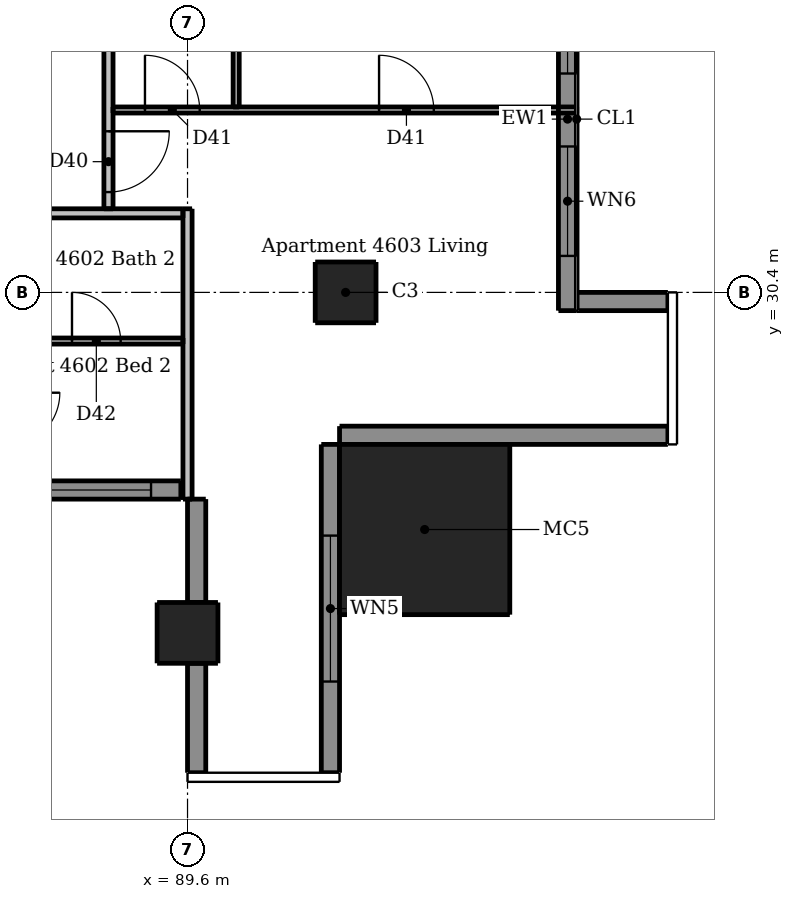
"""IFC4 building model, lengths in metres.
Left out: names, types, materials, properties, quantities, classifications, styles, units other than length and angle.
Written with IfcOpenShell. Run it as: python <this file> out.ifc"""

import sys

from ifc_helpers import new_model, si_unit, direction, frame, frame_2d, origin, origin_2d, place, context, subcontext, project, spatial, rectangle, extrude, element, fill, save


model = new_model("IFC4")
c1 = context("Model", 3, precision=1e-05, world=origin(), true_north=direction((0.0, 1.0)))
c2 = subcontext(c1, "Body", "Model", "MODEL_VIEW")
j1 = project(units=[si_unit("LENGTHUNIT", "METRE"), si_unit("PLANEANGLEUNIT", "RADIAN")], contexts=[c1])
p1 = place(None, origin())
s1 = spatial("IfcSite", under=j1, at=p1, CompositionType="ELEMENT")
p2 = place(p1, origin())
s2 = spatial("IfcBuilding", under=s1, at=p2, CompositionType="ELEMENT")
p3 = place(p2, frame((0.0, 0.0, 171.4)))
s3 = spatial("IfcBuildingStorey", under=s2, at=p3, CompositionType="ELEMENT", Elevation=171.4)
for number, where, z_axis, x_axis in (
    (1, (89.6, 24.8, 0.0), (0.0, 0.0, 1.0), (1.0, 0.0, 0.0)),
    (2, (92.2, 30.4, 0.0), (0.0, 0.0, 1.0), (1.0, 0.0, 0.0)),
):
    element("IfcColumn", number, at=place(p3, frame(where, z_axis=z_axis, x_axis=x_axis)), inside=s3, PredefinedType="COLUMN", context=c2, shape_type="SweptSolid", body=[
        extrude(rectangle(XDim=1.0, YDim=1.0, at=origin_2d()), origin(), (0.0, 0.0, 1.0), 3.05),
    ])
p4 = place(p3, frame((93.5, 26.5, 0.0), z_axis=(0.0, 0.0, 1.0), x_axis=(1.0, 0.0, 0.0)))
e3 = element("IfcColumn", 3, at=p4, inside=s3, PredefinedType="COLUMN", context=c2, shape_type="SweptSolid", body=[
    extrude(rectangle(XDim=2.8, YDim=2.8, at=origin_2d()), origin(), (0.0, 0.0, 1.0), 3.3),
])
p5 = place(p3, frame((89.75, 27.0, 0.0), z_axis=(0.0, 0.0, 1.0), x_axis=(0.0, -1.0, 0.0)))
e4 = element("IfcWall", 4, at=p5, inside=s3, PredefinedType="SOLIDWALL", context=c2, shape_type="SweptSolid", body=[
    extrude(rectangle(XDim=1.7, YDim=0.3, at=frame_2d((0.85, 0.0))), origin(), (0.0, 0.0, 1.0), 3.05),
])
p6 = place(p3, frame((89.75, 24.3, 0.0), z_axis=(0.0, 0.0, 1.0), x_axis=(0.0, -1.0, 0.0)))
e5 = element("IfcWall", 5, at=p6, inside=s3, PredefinedType="SOLIDWALL", context=c2, shape_type="SweptSolid", body=[
    extrude(rectangle(XDim=1.8, YDim=0.3, at=frame_2d((0.9, 0.0))), origin(), (0.0, 0.0, 1.0), 3.05),
])
p7 = place(p3, frame((91.95, 22.5, 0.0), z_axis=(0.0, 0.0, 1.0), x_axis=(0.0, 1.0, 0.0)))
e6 = element("IfcWall", 6, at=p7, inside=s3, PredefinedType="SOLIDWALL", context=c2, shape_type="SweptSolid", body=[
    extrude(rectangle(XDim=5.4, YDim=0.3, at=frame_2d((2.7, 0.0))), origin(), (0.0, 0.0, 1.0), 3.05),
])
p8 = place(p7, frame((1.5, 0.0, 0.15)))
e7 = element("IfcOpeningElement", 7, at=p8, cuts=e6, PredefinedType="OPENING", context=c2, shape_type="SweptSolid", body=[
    extrude(rectangle(XDim=2.4, YDim=2.1, at=frame_2d((1.2, 1.05))), frame((0.0, 0.16, 0.0), z_axis=(0.0, -1.0, 0.0), x_axis=(1.0, 0.0, 0.0)), (0.0, 0.0, 1.0), 0.32),
])
p9 = place(p3, frame((92.1, 28.05, 0.0), z_axis=(0.0, 0.0, 1.0), x_axis=(1.0, 0.0, 0.0)))
e8 = element("IfcWall", 8, at=p9, inside=s3, PredefinedType="SOLIDWALL", context=c2, shape_type="SweptSolid", body=[
    extrude(rectangle(XDim=5.4, YDim=0.3, at=frame_2d((2.7, 0.0))), origin(), (0.0, 0.0, 1.0), 3.05),
])
p10 = place(p3, frame((97.5, 30.25, 0.0), z_axis=(0.0, 0.0, 1.0), x_axis=(-1.0, 0.0, 0.0)))
e9 = element("IfcWall", 9, at=p10, inside=s3, PredefinedType="SOLIDWALL", context=c2, shape_type="SweptSolid", body=[
    extrude(rectangle(XDim=1.5, YDim=0.3, at=frame_2d((0.75, 0.0))), origin(), (0.0, 0.0, 1.0), 3.05),
])
p11 = place(p3, frame((83.7, 27.15, 0.0), z_axis=(0.0, 0.0, 1.0), x_axis=(1.0, 0.0, 0.0)))
e10 = element("IfcWall", 10, at=p11, inside=s3, PredefinedType="SOLIDWALL", context=c2, shape_type="SweptSolid", body=[
    extrude(rectangle(XDim=5.79, YDim=0.3, at=frame_2d((2.895, 0.0))), origin(), (0.0, 0.0, 1.0), 3.05),
])
p12 = place(p11, frame((0.5, 0.0, 0.15)))
e11 = element("IfcOpeningElement", 11, at=p12, cuts=e10, PredefinedType="OPENING", context=c2, shape_type="SweptSolid", body=[
    extrude(rectangle(XDim=1.8, YDim=2.1, at=frame_2d((0.9, 1.05))), frame((0.0, 0.16, 0.0), z_axis=(0.0, -1.0, 0.0), x_axis=(1.0, 0.0, 0.0)), (0.0, 0.0, 1.0), 0.32),
])
p13 = place(p11, frame((3.5, 0.0, 0.15)))
e12 = element("IfcOpeningElement", 12, at=p13, cuts=e10, PredefinedType="OPENING", context=c2, shape_type="SweptSolid", body=[
    extrude(rectangle(XDim=1.8, YDim=2.1, at=frame_2d((0.9, 1.05))), frame((0.0, 0.16, 0.0), z_axis=(0.0, -1.0, 0.0), x_axis=(1.0, 0.0, 0.0)), (0.0, 0.0, 1.0), 0.32),
])
p14 = place(p3, frame((95.85, 30.1, 0.0), z_axis=(0.0, 0.0, 1.0), x_axis=(0.0, 1.0, 0.0)))
e13 = element("IfcWall", 13, at=p14, inside=s3, PredefinedType="SOLIDWALL", context=c2, shape_type="SweptSolid", body=[
    extrude(rectangle(XDim=6.3, YDim=0.3, at=frame_2d((3.15, 0.0))), origin(), (0.0, 0.0, 1.0), 3.05),
])
p15 = place(p14, frame((0.9, 0.0, 0.15)))
e14 = element("IfcOpeningElement", 14, at=p15, cuts=e13, PredefinedType="OPENING", context=c2, shape_type="SweptSolid", body=[
    extrude(rectangle(XDim=1.8, YDim=2.1, at=frame_2d((0.9, 1.05))), frame((0.0, 0.16, 0.0), z_axis=(0.0, -1.0, 0.0), x_axis=(1.0, 0.0, 0.0)), (0.0, 0.0, 1.0), 0.32),
])
p16 = place(p14, frame((3.9, 0.0, 0.15)))
e15 = element("IfcOpeningElement", 15, at=p16, cuts=e13, PredefinedType="OPENING", context=c2, shape_type="SweptSolid", body=[
    extrude(rectangle(XDim=1.8, YDim=2.1, at=frame_2d((0.9, 1.05))), frame((0.0, 0.16, 0.0), z_axis=(0.0, -1.0, 0.0), x_axis=(1.0, 0.0, 0.0)), (0.0, 0.0, 1.0), 0.32),
])
p17 = place(p3, frame((90.4, 33.45, 0.0), z_axis=(0.0, 0.0, 1.0), x_axis=(0.0, 1.0, 0.0)))
e16 = element("IfcWall", 16, at=p17, inside=s3, PredefinedType="PARTITIONING", context=c2, shape_type="SweptSolid", body=[
    extrude(rectangle(XDim=5.875, YDim=0.1, at=frame_2d((2.938, 0.0))), origin(), (0.0, 0.0, 1.0), 3.05),
])
p18 = place(p17, frame((3.75, 0.0, 0.0)))
e17 = element("IfcOpeningElement", 17, at=p18, cuts=e16, PredefinedType="OPENING", context=c2, shape_type="SweptSolid", body=[
    extrude(rectangle(XDim=0.8, YDim=2.1, at=frame_2d((0.4, 1.05))), frame((0.0, 0.06, 0.0), z_axis=(0.0, -1.0, 0.0), x_axis=(1.0, 0.0, 0.0)), (0.0, 0.0, 1.0), 0.12),
])
p19 = place(p3, frame((88.375, 33.4, 0.0), z_axis=(0.0, 0.0, 1.0), x_axis=(1.0, 0.0, 0.0)))
e18 = element("IfcWall", 18, at=p19, inside=s3, PredefinedType="PARTITIONING", context=c2, shape_type="SweptSolid", body=[
    extrude(rectangle(XDim=7.625, YDim=0.1, at=frame_2d((3.812, 0.0))), origin(), (0.0, 0.0, 1.0), 3.05),
])
p20 = place(p19, frame((0.525, 0.0, 0.0)))
e19 = element("IfcOpeningElement", 19, at=p20, cuts=e18, PredefinedType="OPENING", context=c2, shape_type="SweptSolid", body=[
    extrude(rectangle(XDim=0.9, YDim=2.1, at=frame_2d((0.45, 1.05))), frame((0.0, 0.06, 0.0), z_axis=(0.0, -1.0, 0.0), x_axis=(1.0, 0.0, 0.0)), (0.0, 0.0, 1.0), 0.12),
])
p21 = place(p19, frame((4.375, 0.0, 0.0)))
e20 = element("IfcOpeningElement", 20, at=p21, cuts=e18, PredefinedType="OPENING", context=c2, shape_type="SweptSolid", body=[
    extrude(rectangle(XDim=0.9, YDim=2.1, at=frame_2d((0.45, 1.05))), frame((0.0, 0.06, 0.0), z_axis=(0.0, -1.0, 0.0), x_axis=(1.0, 0.0, 0.0)), (0.0, 0.0, 1.0), 0.12),
])
p22 = place(p3, frame((83.65, 29.6, 0.0), z_axis=(0.0, 0.0, 1.0), x_axis=(1.0, 0.0, 0.0)))
e21 = element("IfcWall", 21, at=p22, inside=s3, PredefinedType="PARTITIONING", context=c2, shape_type="SweptSolid", body=[
    extrude(rectangle(XDim=5.875, YDim=0.1, at=frame_2d((2.938, 0.0))), origin(), (0.0, 0.0, 1.0), 3.05),
])
p23 = place(p22, frame((1.0, 0.0, 0.0)))
e22 = element("IfcOpeningElement", 22, at=p23, cuts=e21, PredefinedType="OPENING", context=c2, shape_type="SweptSolid", body=[
    extrude(rectangle(XDim=0.9, YDim=2.1, at=frame_2d((0.45, 1.05))), frame((0.0, 0.06, 0.0), z_axis=(0.0, -1.0, 0.0), x_axis=(1.0, 0.0, 0.0)), (0.0, 0.0, 1.0), 0.12),
])
p24 = place(p22, frame((4.05, 0.0, 0.0)))
e23 = element("IfcOpeningElement", 23, at=p24, cuts=e21, PredefinedType="OPENING", context=c2, shape_type="SweptSolid", body=[
    extrude(rectangle(XDim=0.8, YDim=2.1, at=frame_2d((0.4, 1.05))), frame((0.0, 0.06, 0.0), z_axis=(0.0, -1.0, 0.0), x_axis=(1.0, 0.0, 0.0)), (0.0, 0.0, 1.0), 0.12),
])
p25 = place(p3, frame((88.3, 61.175, 0.0), z_axis=(0.0, 0.0, 1.0), x_axis=(0.0, -1.0, 0.0)))
e24 = element("IfcWall", 24, at=p25, inside=s3, PredefinedType="PARTITIONING", context=c2, shape_type="SweptSolid", body=[
    extrude(rectangle(XDim=29.4, YDim=0.15, at=frame_2d((14.7, 0.0))), origin(), (0.0, 0.0, 1.0), 3.05),
])
p26 = place(p25, frame((28.125, 0.0, 0.0)))
e25 = element("IfcOpeningElement", 25, at=p26, cuts=e24, PredefinedType="OPENING", context=c2, shape_type="SweptSolid", body=[
    extrude(rectangle(XDim=1.0, YDim=2.1, at=frame_2d((0.5, 1.05))), frame((0.0, 0.085, 0.0), z_axis=(0.0, -1.0, 0.0), x_axis=(1.0, 0.0, 0.0)), (0.0, 0.0, 1.0), 0.17),
])
p27 = place(p25, frame((10.775, 0.0, 0.0)))
e26 = element("IfcOpeningElement", 26, at=p27, cuts=e24, PredefinedType="OPENING", context=c2, shape_type="SweptSolid", body=[
    extrude(rectangle(XDim=1.0, YDim=2.1, at=frame_2d((0.5, 1.05))), frame((0.0, 0.085, 0.0), z_axis=(0.0, -1.0, 0.0), x_axis=(1.0, 0.0, 0.0)), (0.0, 0.0, 1.0), 0.17),
])
p28 = place(p3, frame((89.6, 27.0, 0.0), z_axis=(0.0, 0.0, 1.0), x_axis=(0.0, 1.0, 0.0)))
e27 = element("IfcWall", 27, at=p28, inside=s3, PredefinedType="PARTITIONING", context=c2, shape_type="SweptSolid", body=[
    extrude(rectangle(XDim=4.775, YDim=0.15, at=frame_2d((2.387, 0.0))), origin(), (0.0, 0.0, 1.0), 2.51),
])
p29 = place(p3, frame((89.525, 31.7, 0.0), z_axis=(0.0, 0.0, 1.0), x_axis=(-1.0, 0.0, 0.0)))
e28 = element("IfcWall", 28, at=p29, inside=s3, PredefinedType="PARTITIONING", context=c2, shape_type="SweptSolid", body=[
    extrude(rectangle(XDim=30.55, YDim=0.15, at=frame_2d((15.275, 0.0))), origin(), (0.0, 0.0, 1.0), 3.05),
])
p30 = place(p29, frame((26.775, 0.0, 0.0)))
e29 = element("IfcOpeningElement", 29, at=p30, cuts=e28, PredefinedType="OPENING", context=c2, shape_type="SweptSolid", body=[
    extrude(rectangle(XDim=1.0, YDim=2.1, at=frame_2d((0.5, 1.05))), frame((0.0, 0.085, 0.0), z_axis=(0.0, -1.0, 0.0), x_axis=(1.0, 0.0, 0.0)), (0.0, 0.0, 1.0), 0.17),
])
p31 = place(p29, frame((8.425, 0.0, 0.0)))
e30 = element("IfcOpeningElement", 30, at=p31, cuts=e28, PredefinedType="OPENING", context=c2, shape_type="SweptSolid", body=[
    extrude(rectangle(XDim=1.0, YDim=2.1, at=frame_2d((0.5, 1.05))), frame((0.0, 0.085, 0.0), z_axis=(0.0, -1.0, 0.0), x_axis=(1.0, 0.0, 0.0)), (0.0, 0.0, 1.0), 0.17),
])
p32 = place(p8, origin())
e31 = element("IfcWindow", 31, at=p32, inside=s3, PartitioningType="DOUBLE_PANEL_VERTICAL", PredefinedType="WINDOW", context=c2, shape_type="SweptSolid", body=[
    extrude(rectangle(XDim=2.4, YDim=2.1, at=frame_2d((1.2, 1.05))), frame((0.0, 0.03, 0.0), z_axis=(0.0, -1.0, 0.0), x_axis=(1.0, 0.0, 0.0)), (0.0, 0.0, 1.0), 0.06),
])
fill(e7, e31)
p33 = place(p13, origin())
e32 = element("IfcWindow", 32, at=p33, inside=s3, PartitioningType="DOUBLE_PANEL_VERTICAL", PredefinedType="WINDOW", context=c2, shape_type="SweptSolid", body=[
    extrude(rectangle(XDim=1.8, YDim=2.1, at=frame_2d((0.9, 1.05))), frame((0.0, 0.03, 0.0), z_axis=(0.0, -1.0, 0.0), x_axis=(1.0, 0.0, 0.0)), (0.0, 0.0, 1.0), 0.06),
])
fill(e12, e32)
p34 = place(p15, origin())
e33 = element("IfcWindow", 33, at=p34, inside=s3, PartitioningType="DOUBLE_PANEL_VERTICAL", PredefinedType="WINDOW", context=c2, shape_type="SweptSolid", body=[
    extrude(rectangle(XDim=1.8, YDim=2.1, at=frame_2d((0.9, 1.05))), frame((0.0, 0.03, 0.0), z_axis=(0.0, -1.0, 0.0), x_axis=(1.0, 0.0, 0.0)), (0.0, 0.0, 1.0), 0.06),
])
fill(e14, e33)
p35 = place(p16, origin())
e34 = element("IfcWindow", 34, at=p35, inside=s3, PartitioningType="DOUBLE_PANEL_VERTICAL", PredefinedType="WINDOW", context=c2, shape_type="SweptSolid", body=[
    extrude(rectangle(XDim=1.8, YDim=2.1, at=frame_2d((0.9, 1.05))), frame((0.0, 0.03, 0.0), z_axis=(0.0, -1.0, 0.0), x_axis=(1.0, 0.0, 0.0)), (0.0, 0.0, 1.0), 0.06),
])
fill(e15, e34)
p36 = place(p24, origin())
e35 = element("IfcDoor", 35, at=p36, inside=s3, OperationType="SINGLE_SWING_LEFT", PredefinedType="DOOR", context=c2, shape_type="SweptSolid", body=[
    extrude(rectangle(XDim=0.8, YDim=2.1, at=frame_2d((0.4, 1.05))), frame((0.0, 0.025, 0.0), z_axis=(0.0, -1.0, 0.0), x_axis=(1.0, 0.0, 0.0)), (0.0, 0.0, 1.0), 0.05),
])
fill(e23, e35)
p37 = place(p26, origin())
e36 = element("IfcDoor", 36, at=p37, inside=s3, OperationType="SINGLE_SWING_LEFT", PredefinedType="DOOR", context=c2, shape_type="SweptSolid", body=[
    extrude(rectangle(XDim=1.0, YDim=2.1, at=frame_2d((0.5, 1.05))), frame((0.0, 0.025, 0.0), z_axis=(0.0, -1.0, 0.0), x_axis=(1.0, 0.0, 0.0)), (0.0, 0.0, 1.0), 0.05),
])
fill(e25, e36)
p38 = place(p20, origin())
e37 = element("IfcDoor", 37, at=p38, inside=s3, OperationType="SINGLE_SWING_LEFT", PredefinedType="DOOR", context=c2, shape_type="SweptSolid", body=[
    extrude(rectangle(XDim=0.9, YDim=2.1, at=frame_2d((0.45, 1.05))), frame((0.0, 0.025, 0.0), z_axis=(0.0, -1.0, 0.0), x_axis=(1.0, 0.0, 0.0)), (0.0, 0.0, 1.0), 0.05),
])
fill(e19, e37)
p39 = place(p21, origin())
e38 = element("IfcDoor", 38, at=p39, inside=s3, OperationType="SINGLE_SWING_LEFT", PredefinedType="DOOR", context=c2, shape_type="SweptSolid", body=[
    extrude(rectangle(XDim=0.9, YDim=2.1, at=frame_2d((0.45, 1.05))), frame((0.0, 0.025, 0.0), z_axis=(0.0, -1.0, 0.0), x_axis=(1.0, 0.0, 0.0)), (0.0, 0.0, 1.0), 0.05),
])
fill(e20, e38)
save(model, sys.argv[1])
